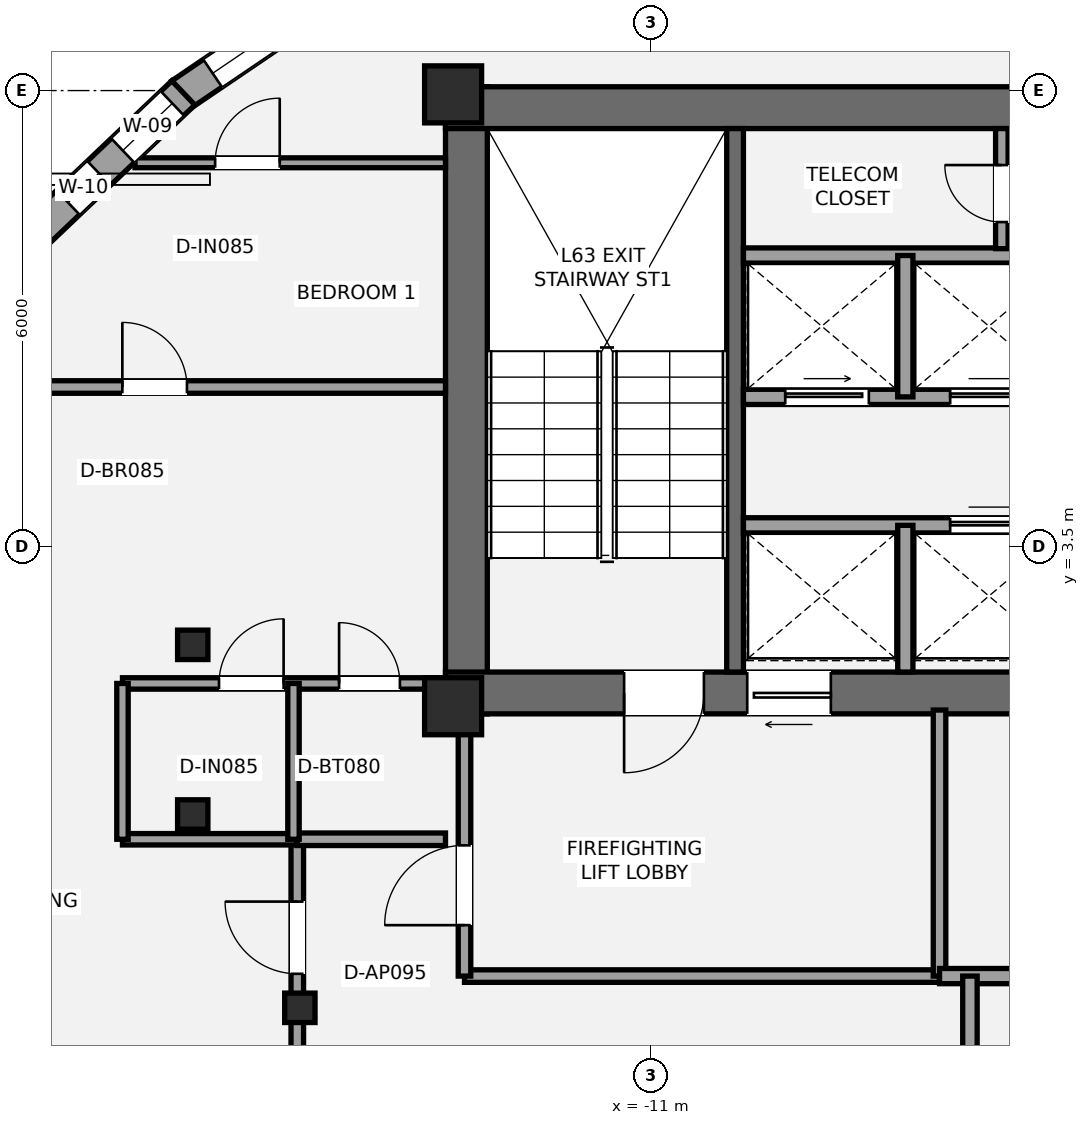
"""IFC4 building model, lengths in metres.
Left out: names, types, materials, properties, quantities, classifications, styles, units other than length and angle.
Written with IfcOpenShell. Run it as: python <this file> out.ifc"""

import sys

from ifc_helpers import new_model, si_unit, direction, frame, frame_2d, origin, origin_2d, place, context, subcontext, project, spatial, rectangle, i_section, extrude, element, fill, save


model = new_model("IFC4")
c1 = context("Model", 3, precision=1e-05, world=origin(), true_north=direction((0.0, 1.0)))
c2 = subcontext(c1, "Body", "Model", "MODEL_VIEW")
j1 = project(units=[si_unit("LENGTHUNIT", "METRE"), si_unit("PLANEANGLEUNIT", "RADIAN")], contexts=[c1])
p1 = place(None, origin())
s1 = spatial("IfcSite", under=j1, at=p1, CompositionType="ELEMENT")
p2 = place(p1, origin())
s2 = spatial("IfcBuilding", under=s1, at=p2, CompositionType="ELEMENT")
p3 = place(p2, frame((0.0, 0.0, 225.75)))
s3 = spatial("IfcBuildingStorey", under=s2, at=p3, CompositionType="ELEMENT", Elevation=225.75)
p4 = place(p3, frame((-13.425, 1.3, 0.0), z_axis=(0.0, 0.0, 1.0), x_axis=(0.0, 1.0, 0.0)))
e1 = element("IfcWall", 1, at=p4, inside=s3, PredefinedType="SHEAR", context=c2, shape_type="SweptSolid", body=[
    extrude(rectangle(XDim=8.25, YDim=0.55, at=frame_2d((4.125, 0.0))), origin(), (0.0, 0.0, 1.0), 3.15),
])
p5 = place(p3, frame((-13.7, 9.275, 0.0), z_axis=(0.0, 0.0, 1.0), x_axis=(1.0, 0.0, 0.0)))
e2 = element("IfcWall", 2, at=p5, inside=s3, PredefinedType="SHEAR", context=c2, shape_type="SweptSolid", body=[
    extrude(rectangle(XDim=9.175, YDim=0.55, at=frame_2d((4.587, 0.0))), origin(), (0.0, 0.0, 1.0), 3.15),
])
p6 = place(p3, frame((-4.925, 1.575, 0.0), z_axis=(0.0, 0.0, 1.0), x_axis=(-1.0, 0.0, 0.0)))
e3 = element("IfcWall", 3, at=p6, inside=s3, PredefinedType="SHEAR", context=c2, shape_type="SweptSolid", body=[
    extrude(rectangle(XDim=8.775, YDim=0.55, at=frame_2d((4.387, 0.0))), origin(), (0.0, 0.0, 1.0), 3.15),
])
p7 = place(p6, frame((5.375, 0.0, 0.0)))
e4 = element("IfcOpeningElement", 4, at=p7, cuts=e3, PredefinedType="OPENING", context=c2, shape_type="SweptSolid", body=[
    extrude(rectangle(XDim=1.05, YDim=2.15, at=frame_2d((0.525, 1.075))), frame((0.0, 0.285, 0.0), z_axis=(0.0, -1.0, 0.0), x_axis=(1.0, 0.0, 0.0)), (0.0, 0.0, 1.0), 0.57),
])
p8 = place(p6, frame((3.705, 0.0, 0.0)))
e5 = element("IfcOpeningElement", 5, at=p8, cuts=e3, PredefinedType="OPENING", context=c2, shape_type="SweptSolid", body=[
    extrude(rectangle(XDim=1.1, YDim=2.2, at=frame_2d((0.55, 1.1))), frame((0.0, 0.285, 0.0), z_axis=(0.0, -1.0, 0.0), x_axis=(1.0, 0.0, 0.0)), (0.0, 0.0, 1.0), 0.57),
])
p9 = place(p3, frame((-9.89, 1.85, 0.0), z_axis=(0.0, 0.0, 1.0), x_axis=(0.0, 1.0, 0.0)))
e6 = element("IfcWall", 6, at=p9, inside=s3, PredefinedType="SHEAR", context=c2, shape_type="SweptSolid", body=[
    extrude(rectangle(XDim=7.15, YDim=0.22, at=frame_2d((3.575, 0.0))), origin(), (0.0, 0.0, 1.0), 3.15),
])
for number, where, z_axis, x_axis in (
    (7, (-13.6, 1.4, 0.0), (0.0, 0.0, 1.0), (1.0, 0.0, 0.0)),
    (8, (-13.6, 9.45, 0.0), (0.0, 0.0, 1.0), (1.0, 0.0, 0.0)),
):
    element("IfcColumn", number, at=place(p3, frame(where, z_axis=z_axis, x_axis=x_axis)), inside=s3, PredefinedType="PILASTER", context=c2, shape_type="SweptSolid", body=[
        extrude(rectangle(XDim=0.75, YDim=0.75, at=origin_2d()), origin(), (0.0, 0.0, 1.0), 3.15),
    ])
for number, where, z_axis, x_axis in (
    (9, (-17.026, 2.208, 0.0), (0.0, 0.0, 1.0), (1.0, 0.0, 0.0)),
    (10, (-17.026, -0.024, 0.0), (0.0, 0.0, 1.0), (1.0, 0.0, 0.0)),
    (11, (-15.616, -2.567, 0.0), (0.0, 0.0, 1.0), (1.0, 0.0, 0.0)),
):
    element("IfcColumn", number, at=place(p3, frame(where, z_axis=z_axis, x_axis=x_axis)), inside=s3, PredefinedType="COLUMN", context=c2, shape_type="SweptSolid", body=[
        extrude(i_section(OverallWidth=0.399, OverallDepth=0.387, WebThickness=0.021, FlangeThickness=0.033, at=origin_2d()), origin(), (0.0, 0.0, 1.0), 3.15),
    ])
p10 = place(p3, frame((-17.177, 9.447, 0.0), z_axis=(0.0, 0.0, 1.0), x_axis=(0.827635686249, 0.561265686504, 0.0)))
e12 = element("IfcWall", 12, at=p10, inside=s3, PredefinedType="STANDARD", context=c2, shape_type="SweptSolid", body=[
    extrude(rectangle(XDim=3.749, YDim=0.44, at=frame_2d((1.875, 0.0))), origin(), (0.0, 0.0, 1.0), 2.336),
])
p11 = place(p10, frame((0.5, 0.0, 0.55)))
e13 = element("IfcOpeningElement", 13, at=p11, cuts=e12, PredefinedType="OPENING", context=c2, shape_type="SweptSolid", body=[
    extrude(rectangle(XDim=1.75, YDim=1.55, at=frame_2d((0.875, 0.775))), frame((0.0, 0.23, 0.0), z_axis=(0.0, -1.0, 0.0), x_axis=(1.0, 0.0, 0.0)), (0.0, 0.0, 1.0), 0.46),
])
p12 = place(p3, frame((-19.705, 7.038, 0.0), z_axis=(0.0, 0.0, 1.0), x_axis=(0.724503260132, 0.689271373306, 0.0)))
e14 = element("IfcWall", 14, at=p12, inside=s3, PredefinedType="STANDARD", context=c2, shape_type="SweptSolid", body=[
    extrude(rectangle(XDim=3.527, YDim=0.44, at=frame_2d((1.764, 0.0))), origin(), (0.0, 0.0, 1.0), 2.336),
])
p13 = place(p12, frame((2.427, 0.0, 0.58)))
e15 = element("IfcOpeningElement", 15, at=p13, cuts=e14, PredefinedType="OPENING", context=c2, shape_type="SweptSolid", body=[
    extrude(rectangle(XDim=0.9, YDim=1.35, at=frame_2d((0.45, 0.675))), frame((0.0, 0.23, 0.0), z_axis=(0.0, -1.0, 0.0), x_axis=(1.0, 0.0, 0.0)), (0.0, 0.0, 1.0), 0.46),
])
p14 = place(p12, frame((1.434, 0.0, 0.58)))
e16 = element("IfcOpeningElement", 16, at=p14, cuts=e14, PredefinedType="OPENING", context=c2, shape_type="SweptSolid", body=[
    extrude(rectangle(XDim=0.56, YDim=1.15, at=frame_2d((0.28, 0.575))), frame((0.0, 0.23, 0.0), z_axis=(0.0, -1.0, 0.0), x_axis=(1.0, 0.0, 0.0)), (0.0, 0.0, 1.0), 0.46),
])
p15 = place(p3, frame((-13.45, -2.15, 0.0), z_axis=(0.0, 0.0, 1.0), x_axis=(1.0, 0.0, 0.0)))
e17 = element("IfcWall", 17, at=p15, inside=s3, PredefinedType="PARTITIONING", context=c2, shape_type="SweptSolid", body=[
    extrude(rectangle(XDim=6.25, YDim=0.165, at=frame_2d((3.125, 0.0))), origin(), (0.0, 0.0, 1.0), 2.423),
])
p16 = place(p3, frame((-13.45, -2.15, 0.0), z_axis=(0.0, 0.0, 1.0), x_axis=(0.0, 1.0, 0.0)))
e18 = element("IfcWall", 18, at=p16, inside=s3, PredefinedType="PARTITIONING", context=c2, shape_type="SweptSolid", body=[
    extrude(rectangle(XDim=3.5, YDim=0.165, at=frame_2d((1.75, 0.0))), origin(), (0.0, 0.0, 1.0), 2.423),
])
p17 = place(p16, frame((0.67, 0.0, 0.0)))
e19 = element("IfcOpeningElement", 19, at=p17, cuts=e18, PredefinedType="OPENING", context=c2, shape_type="SweptSolid", body=[
    extrude(rectangle(XDim=1.05, YDim=2.15, at=frame_2d((0.525, 1.075))), frame((0.0, 0.093, 0.0), z_axis=(0.0, -1.0, 0.0), x_axis=(1.0, 0.0, 0.0)), (0.0, 0.0, 1.0), 0.185),
])
p18 = place(p3, frame((-7.2, -2.15, 0.0), z_axis=(0.0, 0.0, 1.0), x_axis=(0.0, 1.0, 0.0)))
e20 = element("IfcWall", 20, at=p18, inside=s3, PredefinedType="PARTITIONING", context=c2, shape_type="SweptSolid", body=[
    extrude(rectangle(XDim=3.5, YDim=0.165, at=frame_2d((1.75, 0.0))), origin(), (0.0, 0.0, 1.0), 2.423),
])
p19 = place(p3, frame((-7.2, -2.15, 0.0), z_axis=(0.0, 0.0, 1.0), x_axis=(1.0, 0.0, 0.0)))
e21 = element("IfcWall", 21, at=p19, inside=s3, PredefinedType="SOLIDWALL", context=c2, shape_type="SweptSolid", body=[
    extrude(rectangle(XDim=2.25, YDim=0.2, at=frame_2d((1.125, 0.0))), origin(), (0.0, 0.0, 1.0), 2.97),
])
p20 = place(p3, frame((-9.78, 3.78, 0.0), z_axis=(0.0, 0.0, 1.0), x_axis=(1.0, 0.0, 0.0)))
e22 = element("IfcWall", 22, at=p20, inside=s3, PredefinedType="SOLIDWALL", context=c2, shape_type="SweptSolid", body=[
    extrude(rectangle(XDim=4.305, YDim=0.2, at=frame_2d((2.152, 0.0))), origin(), (0.0, 0.0, 1.0), 2.97),
])
p21 = place(p20, frame((2.72, 0.0, 0.0)))
e23 = element("IfcOpeningElement", 23, at=p21, cuts=e22, PredefinedType="OPENING", context=c2, shape_type="SweptSolid", body=[
    extrude(rectangle(XDim=1.1, YDim=2.2, at=frame_2d((0.55, 1.1))), frame((0.0, 0.11, 0.0), z_axis=(0.0, -1.0, 0.0), x_axis=(1.0, 0.0, 0.0)), (0.0, 0.0, 1.0), 0.22),
])
p22 = place(p3, frame((-7.65, 1.85, 0.0), z_axis=(0.0, 0.0, 1.0), x_axis=(0.0, 1.0, 0.0)))
e24 = element("IfcWall", 24, at=p22, inside=s3, PredefinedType="SOLIDWALL", context=c2, shape_type="SweptSolid", body=[
    extrude(rectangle(XDim=1.93, YDim=0.2, at=frame_2d((0.965, 0.0))), origin(), (0.0, 0.0, 1.0), 2.97),
])
p23 = place(p3, frame((-9.78, 5.47, 0.0), z_axis=(0.0, 0.0, 1.0), x_axis=(1.0, 0.0, 0.0)))
e25 = element("IfcWall", 25, at=p23, inside=s3, PredefinedType="SOLIDWALL", context=c2, shape_type="SweptSolid", body=[
    extrude(rectangle(XDim=4.305, YDim=0.2, at=frame_2d((2.152, 0.0))), origin(), (0.0, 0.0, 1.0), 2.97),
])
p24 = place(p23, frame((0.55, 0.0, 0.0)))
e26 = element("IfcOpeningElement", 26, at=p24, cuts=e25, PredefinedType="OPENING", context=c2, shape_type="SweptSolid", body=[
    extrude(rectangle(XDim=1.1, YDim=2.2, at=frame_2d((0.55, 1.1))), frame((0.0, 0.11, 0.0), z_axis=(0.0, -1.0, 0.0), x_axis=(1.0, 0.0, 0.0)), (0.0, 0.0, 1.0), 0.22),
])
p25 = place(p23, frame((2.72, 0.0, 0.0)))
e27 = element("IfcOpeningElement", 27, at=p25, cuts=e25, PredefinedType="OPENING", context=c2, shape_type="SweptSolid", body=[
    extrude(rectangle(XDim=1.1, YDim=2.2, at=frame_2d((0.55, 1.1))), frame((0.0, 0.11, 0.0), z_axis=(0.0, -1.0, 0.0), x_axis=(1.0, 0.0, 0.0)), (0.0, 0.0, 1.0), 0.22),
])
p26 = place(p3, frame((-9.78, 7.33, 0.0), z_axis=(0.0, 0.0, 1.0), x_axis=(1.0, 0.0, 0.0)))
e28 = element("IfcWall", 28, at=p26, inside=s3, PredefinedType="SOLIDWALL", context=c2, shape_type="SweptSolid", body=[
    extrude(rectangle(XDim=4.305, YDim=0.2, at=frame_2d((2.152, 0.0))), origin(), (0.0, 0.0, 1.0), 2.97),
])
p27 = place(p3, frame((-7.65, 5.47, 0.0), z_axis=(0.0, 0.0, 1.0), x_axis=(0.0, 1.0, 0.0)))
e29 = element("IfcWall", 29, at=p27, inside=s3, PredefinedType="SOLIDWALL", context=c2, shape_type="SweptSolid", body=[
    extrude(rectangle(XDim=1.86, YDim=0.2, at=frame_2d((0.93, 0.0))), origin(), (0.0, 0.0, 1.0), 2.97),
])
p28 = place(p3, frame((-6.38, 7.42, 0.0), z_axis=(0.0, 0.0, 1.0), x_axis=(0.0, 1.0, 0.0)))
e30 = element("IfcWall", 30, at=p28, inside=s3, PredefinedType="PARTITIONING", context=c2, shape_type="SweptSolid", body=[
    extrude(rectangle(XDim=1.58, YDim=0.165, at=frame_2d((0.79, 0.0))), origin(), (0.0, 0.0, 1.0), 2.97),
])
p29 = place(p28, frame((0.35, 0.0, 0.0)))
e31 = element("IfcOpeningElement", 31, at=p29, cuts=e30, PredefinedType="OPENING", context=c2, shape_type="SweptSolid", body=[
    extrude(rectangle(XDim=0.75, YDim=2.1, at=frame_2d((0.375, 1.05))), frame((0.0, 0.093, 0.0), z_axis=(0.0, -1.0, 0.0), x_axis=(1.0, 0.0, 0.0)), (0.0, 0.0, 1.0), 0.185),
])
p30 = place(p3, frame((-6.8, -4.05, 0.0), z_axis=(0.0, 0.0, 1.0), x_axis=(0.0, 1.0, 0.0)))
e32 = element("IfcWall", 32, at=p30, inside=s3, PredefinedType="PLUMBINGWALL", context=c2, shape_type="SweptSolid", body=[
    extrude(rectangle(XDim=1.9, YDim=0.19, at=frame_2d((0.95, 0.0))), origin(), (0.0, 0.0, 1.0), 2.423),
])
p31 = place(p3, frame((-15.65, -3.95, 0.0), z_axis=(0.0, 0.0, 1.0), x_axis=(0.0, 1.0, 0.0)))
e33 = element("IfcWall", 33, at=p31, inside=s3, PredefinedType="PARTITIONING", context=c2, shape_type="SweptSolid", body=[
    extrude(rectangle(XDim=3.6, YDim=0.165, at=frame_2d((1.8, 0.0))), origin(), (0.0, 0.0, 1.0), 2.357),
])
p32 = place(p31, frame((1.83, 0.0, 0.0)))
e34 = element("IfcOpeningElement", 34, at=p32, cuts=e33, PredefinedType="OPENING", context=c2, shape_type="SweptSolid", body=[
    extrude(rectangle(XDim=0.95, YDim=2.15, at=frame_2d((0.475, 1.075))), frame((0.0, 0.093, 0.0), z_axis=(0.0, -1.0, 0.0), x_axis=(1.0, 0.0, 0.0)), (0.0, 0.0, 1.0), 0.185),
])
p33 = place(p3, frame((-15.65, -0.35, 0.0), z_axis=(0.0, 0.0, 1.0), x_axis=(1.0, 0.0, 0.0)))
e35 = element("IfcWall", 35, at=p33, inside=s3, PredefinedType="PARTITIONING", context=c2, shape_type="SweptSolid", body=[
    extrude(rectangle(XDim=1.95, YDim=0.165, at=frame_2d((0.975, 0.0))), origin(), (0.0, 0.0, 1.0), 2.97),
])
p34 = place(p3, frame((-20.398, 5.6, 0.0), z_axis=(0.0, 0.0, 1.0), x_axis=(1.0, 0.0, 0.0)))
e36 = element("IfcWall", 36, at=p34, inside=s3, PredefinedType="PARTITIONING", context=c2, shape_type="SweptSolid", body=[
    extrude(rectangle(XDim=6.698, YDim=0.165, at=frame_2d((3.349, 0.0))), origin(), (0.0, 0.0, 1.0), 2.423),
])
p35 = place(p34, frame((2.447, 0.0, 0.0)))
e37 = element("IfcOpeningElement", 37, at=p35, cuts=e36, PredefinedType="OPENING", context=c2, shape_type="SweptSolid", body=[
    extrude(rectangle(XDim=0.85, YDim=2.1, at=frame_2d((0.425, 1.05))), frame((0.0, 0.093, 0.0), z_axis=(0.0, -1.0, 0.0), x_axis=(1.0, 0.0, 0.0)), (0.0, 0.0, 1.0), 0.185),
])
p36 = place(p3, frame((-17.95, 1.7, 0.0), z_axis=(0.0, 0.0, 1.0), x_axis=(1.0, 0.0, 0.0)))
e38 = element("IfcWall", 38, at=p36, inside=s3, PredefinedType="PLUMBINGWALL", context=c2, shape_type="SweptSolid", body=[
    extrude(rectangle(XDim=4.25, YDim=0.15, at=frame_2d((2.125, 0.0))), origin(), (0.0, 0.0, 1.0), 2.423),
])
p37 = place(p36, frame((2.85, 0.0, 0.0)))
e39 = element("IfcOpeningElement", 39, at=p37, cuts=e38, PredefinedType="OPENING", context=c2, shape_type="SweptSolid", body=[
    extrude(rectangle(XDim=0.8, YDim=2.1, at=frame_2d((0.4, 1.05))), frame((0.0, 0.085, 0.0), z_axis=(0.0, -1.0, 0.0), x_axis=(1.0, 0.0, 0.0)), (0.0, 0.0, 1.0), 0.17),
])
p38 = place(p36, frame((1.27, 0.0, 0.0)))
e40 = element("IfcOpeningElement", 40, at=p38, cuts=e38, PredefinedType="OPENING", context=c2, shape_type="SweptSolid", body=[
    extrude(rectangle(XDim=0.85, YDim=2.1, at=frame_2d((0.425, 1.05))), frame((0.0, 0.085, 0.0), z_axis=(0.0, -1.0, 0.0), x_axis=(1.0, 0.0, 0.0)), (0.0, 0.0, 1.0), 0.17),
])
p39 = place(p3, frame((-17.95, -0.35, 0.0), z_axis=(0.0, 0.0, 1.0), x_axis=(1.0, 0.0, 0.0)))
e41 = element("IfcWall", 41, at=p39, inside=s3, PredefinedType="PLUMBINGWALL", context=c2, shape_type="SweptSolid", body=[
    extrude(rectangle(XDim=2.3, YDim=0.15, at=frame_2d((1.15, 0.0))), origin(), (0.0, 0.0, 1.0), 2.423),
])
p40 = place(p3, frame((-15.7, -0.35, 0.0), z_axis=(0.0, 0.0, 1.0), x_axis=(0.0, 1.0, 0.0)))
e42 = element("IfcWall", 42, at=p40, inside=s3, PredefinedType="PLUMBINGWALL", context=c2, shape_type="SweptSolid", body=[
    extrude(rectangle(XDim=2.05, YDim=0.15, at=frame_2d((1.025, 0.0))), origin(), (0.0, 0.0, 1.0), 2.97),
])
p41 = place(p3, frame((-17.95, -0.35, 0.0), z_axis=(0.0, 0.0, 1.0), x_axis=(0.0, 1.0, 0.0)))
e43 = element("IfcWall", 43, at=p41, inside=s3, PredefinedType="PLUMBINGWALL", context=c2, shape_type="SweptSolid", body=[
    extrude(rectangle(XDim=2.05, YDim=0.15, at=frame_2d((1.025, 0.0))), origin(), (0.0, 0.0, 1.0), 2.423),
])
p42 = place(p3, frame((-17.785, 8.55, 0.0), z_axis=(0.0, 0.0, 1.0), x_axis=(1.0, 0.0, 0.0)))
e44 = element("IfcWall", 44, at=p42, inside=s3, PredefinedType="PARTITIONING", context=c2, shape_type="SweptSolid", body=[
    extrude(rectangle(XDim=4.085, YDim=0.13, at=frame_2d((2.042, 0.0))), origin(), (0.0, 0.0, 1.0), 2.423),
])
p43 = place(p42, frame((1.054, 0.0, 0.0)))
e45 = element("IfcOpeningElement", 45, at=p43, cuts=e44, PredefinedType="OPENING", context=c2, shape_type="SweptSolid", body=[
    extrude(rectangle(XDim=0.85, YDim=2.1, at=frame_2d((0.425, 1.05))), frame((0.0, 0.075, 0.0), z_axis=(0.0, -1.0, 0.0), x_axis=(1.0, 0.0, 0.0)), (0.0, 0.0, 1.0), 0.15),
])
p44 = place(p11, origin())
e46 = element("IfcWindow", 46, at=p44, inside=s3, PartitioningType="SINGLE_PANEL", PredefinedType="WINDOW", context=c2, shape_type="SweptSolid", body=[
    extrude(rectangle(XDim=1.75, YDim=1.55, at=frame_2d((0.875, 0.775))), frame((0.0, -0.01, 0.0), z_axis=(0.0, -1.0, 0.0), x_axis=(1.0, 0.0, 0.0)), (0.0, 0.0, 1.0), 0.06),
])
fill(e13, e46)
p45 = place(p13, origin())
e47 = element("IfcWindow", 47, at=p45, inside=s3, PartitioningType="SINGLE_PANEL", PredefinedType="WINDOW", context=c2, shape_type="SweptSolid", body=[
    extrude(rectangle(XDim=0.9, YDim=1.35, at=frame_2d((0.45, 0.675))), frame((0.0, -0.01, 0.0), z_axis=(0.0, -1.0, 0.0), x_axis=(1.0, 0.0, 0.0)), (0.0, 0.0, 1.0), 0.06),
])
fill(e15, e47)
p46 = place(p14, origin())
e48 = element("IfcWindow", 48, at=p46, inside=s3, PartitioningType="SINGLE_PANEL", PredefinedType="WINDOW", context=c2, shape_type="SweptSolid", body=[
    extrude(rectangle(XDim=0.56, YDim=1.15, at=frame_2d((0.28, 0.575))), frame((0.0, -0.01, 0.0), z_axis=(0.0, -1.0, 0.0), x_axis=(1.0, 0.0, 0.0)), (0.0, 0.0, 1.0), 0.06),
])
fill(e16, e48)
p47 = place(p7, origin())
e49 = element("IfcDoor", 49, at=p47, inside=s3, OperationType="SINGLE_SWING_RIGHT", PredefinedType="DOOR", context=c2, shape_type="SweptSolid", body=[
    extrude(rectangle(XDim=1.05, YDim=2.15, at=frame_2d((0.525, 1.075))), frame((0.0, 0.025, 0.0), z_axis=(0.0, -1.0, 0.0), x_axis=(1.0, 0.0, 0.0)), (0.0, 0.0, 1.0), 0.05),
])
fill(e4, e49)
p48 = place(p17, origin())
e50 = element("IfcDoor", 50, at=p48, inside=s3, OperationType="SINGLE_SWING_LEFT", PredefinedType="DOOR", context=c2, shape_type="SweptSolid", body=[
    extrude(rectangle(XDim=1.05, YDim=2.15, at=frame_2d((0.525, 1.075))), frame((0.0, 0.025, 0.0), z_axis=(0.0, -1.0, 0.0), x_axis=(1.0, 0.0, 0.0)), (0.0, 0.0, 1.0), 0.05),
])
fill(e19, e50)
p49 = place(p8, origin())
e51 = element("IfcDoor", 51, at=p49, inside=s3, OperationType="SLIDING_TO_LEFT", PredefinedType="DOOR", context=c2, shape_type="SweptSolid", body=[
    extrude(rectangle(XDim=1.1, YDim=2.2, at=frame_2d((0.55, 1.1))), frame((0.0, 0.025, 0.0), z_axis=(0.0, -1.0, 0.0), x_axis=(1.0, 0.0, 0.0)), (0.0, 0.0, 1.0), 0.05),
])
fill(e5, e51)
p50 = place(p24, origin())
e52 = element("IfcDoor", 52, at=p50, inside=s3, OperationType="SLIDING_TO_LEFT", PredefinedType="DOOR", context=c2, shape_type="SweptSolid", body=[
    extrude(rectangle(XDim=1.1, YDim=2.2, at=frame_2d((0.55, 1.1))), frame((0.0, 0.025, 0.0), z_axis=(0.0, -1.0, 0.0), x_axis=(1.0, 0.0, 0.0)), (0.0, 0.0, 1.0), 0.05),
])
fill(e26, e52)
p51 = place(p25, origin())
e53 = element("IfcDoor", 53, at=p51, inside=s3, OperationType="SLIDING_TO_LEFT", PredefinedType="DOOR", context=c2, shape_type="SweptSolid", body=[
    extrude(rectangle(XDim=1.1, YDim=2.2, at=frame_2d((0.55, 1.1))), frame((0.0, 0.025, 0.0), z_axis=(0.0, -1.0, 0.0), x_axis=(1.0, 0.0, 0.0)), (0.0, 0.0, 1.0), 0.05),
])
fill(e27, e53)
p52 = place(p21, origin())
e54 = element("IfcDoor", 54, at=p52, inside=s3, OperationType="SLIDING_TO_LEFT", PredefinedType="DOOR", context=c2, shape_type="SweptSolid", body=[
    extrude(rectangle(XDim=1.1, YDim=2.2, at=frame_2d((0.55, 1.1))), frame((0.0, 0.025, 0.0), z_axis=(0.0, -1.0, 0.0), x_axis=(1.0, 0.0, 0.0)), (0.0, 0.0, 1.0), 0.05),
])
fill(e23, e54)
p53 = place(p29, origin())
e55 = element("IfcDoor", 55, at=p53, inside=s3, OperationType="SINGLE_SWING_RIGHT", PredefinedType="DOOR", context=c2, shape_type="SweptSolid", body=[
    extrude(rectangle(XDim=0.75, YDim=2.1, at=frame_2d((0.375, 1.05))), frame((0.0, 0.025, 0.0), z_axis=(0.0, -1.0, 0.0), x_axis=(1.0, 0.0, 0.0)), (0.0, 0.0, 1.0), 0.05),
])
fill(e31, e55)
p54 = place(p32, origin())
e56 = element("IfcDoor", 56, at=p54, inside=s3, OperationType="SINGLE_SWING_RIGHT", PredefinedType="DOOR", context=c2, shape_type="SweptSolid", body=[
    extrude(rectangle(XDim=0.95, YDim=2.15, at=frame_2d((0.475, 1.075))), frame((0.0, 0.025, 0.0), z_axis=(0.0, -1.0, 0.0), x_axis=(1.0, 0.0, 0.0)), (0.0, 0.0, 1.0), 0.05),
])
fill(e34, e56)
p55 = place(p37, origin())
e57 = element("IfcDoor", 57, at=p55, inside=s3, OperationType="SINGLE_SWING_LEFT", PredefinedType="DOOR", context=c2, shape_type="SweptSolid", body=[
    extrude(rectangle(XDim=0.8, YDim=2.1, at=frame_2d((0.4, 1.05))), frame((0.0, 0.025, 0.0), z_axis=(0.0, -1.0, 0.0), x_axis=(1.0, 0.0, 0.0)), (0.0, 0.0, 1.0), 0.05),
])
fill(e39, e57)
p56 = place(p38, origin())
e58 = element("IfcDoor", 58, at=p56, inside=s3, OperationType="SINGLE_SWING_RIGHT", PredefinedType="DOOR", context=c2, shape_type="SweptSolid", body=[
    extrude(rectangle(XDim=0.85, YDim=2.1, at=frame_2d((0.425, 1.05))), frame((0.0, 0.025, 0.0), z_axis=(0.0, -1.0, 0.0), x_axis=(1.0, 0.0, 0.0)), (0.0, 0.0, 1.0), 0.05),
])
fill(e40, e58)
p57 = place(p35, origin())
e59 = element("IfcDoor", 59, at=p57, inside=s3, OperationType="SINGLE_SWING_LEFT", PredefinedType="DOOR", context=c2, shape_type="SweptSolid", body=[
    extrude(rectangle(XDim=0.85, YDim=2.1, at=frame_2d((0.425, 1.05))), frame((0.0, 0.025, 0.0), z_axis=(0.0, -1.0, 0.0), x_axis=(1.0, 0.0, 0.0)), (0.0, 0.0, 1.0), 0.05),
])
fill(e37, e59)
p58 = place(p43, origin())
e60 = element("IfcDoor", 60, at=p58, inside=s3, OperationType="SINGLE_SWING_RIGHT", PredefinedType="DOOR", context=c2, shape_type="SweptSolid", body=[
    extrude(rectangle(XDim=0.85, YDim=2.1, at=frame_2d((0.425, 1.05))), frame((0.0, 0.025, 0.0), z_axis=(0.0, -1.0, 0.0), x_axis=(1.0, 0.0, 0.0)), (0.0, 0.0, 1.0), 0.05),
])
fill(e45, e60)
save(model, sys.argv[1])
